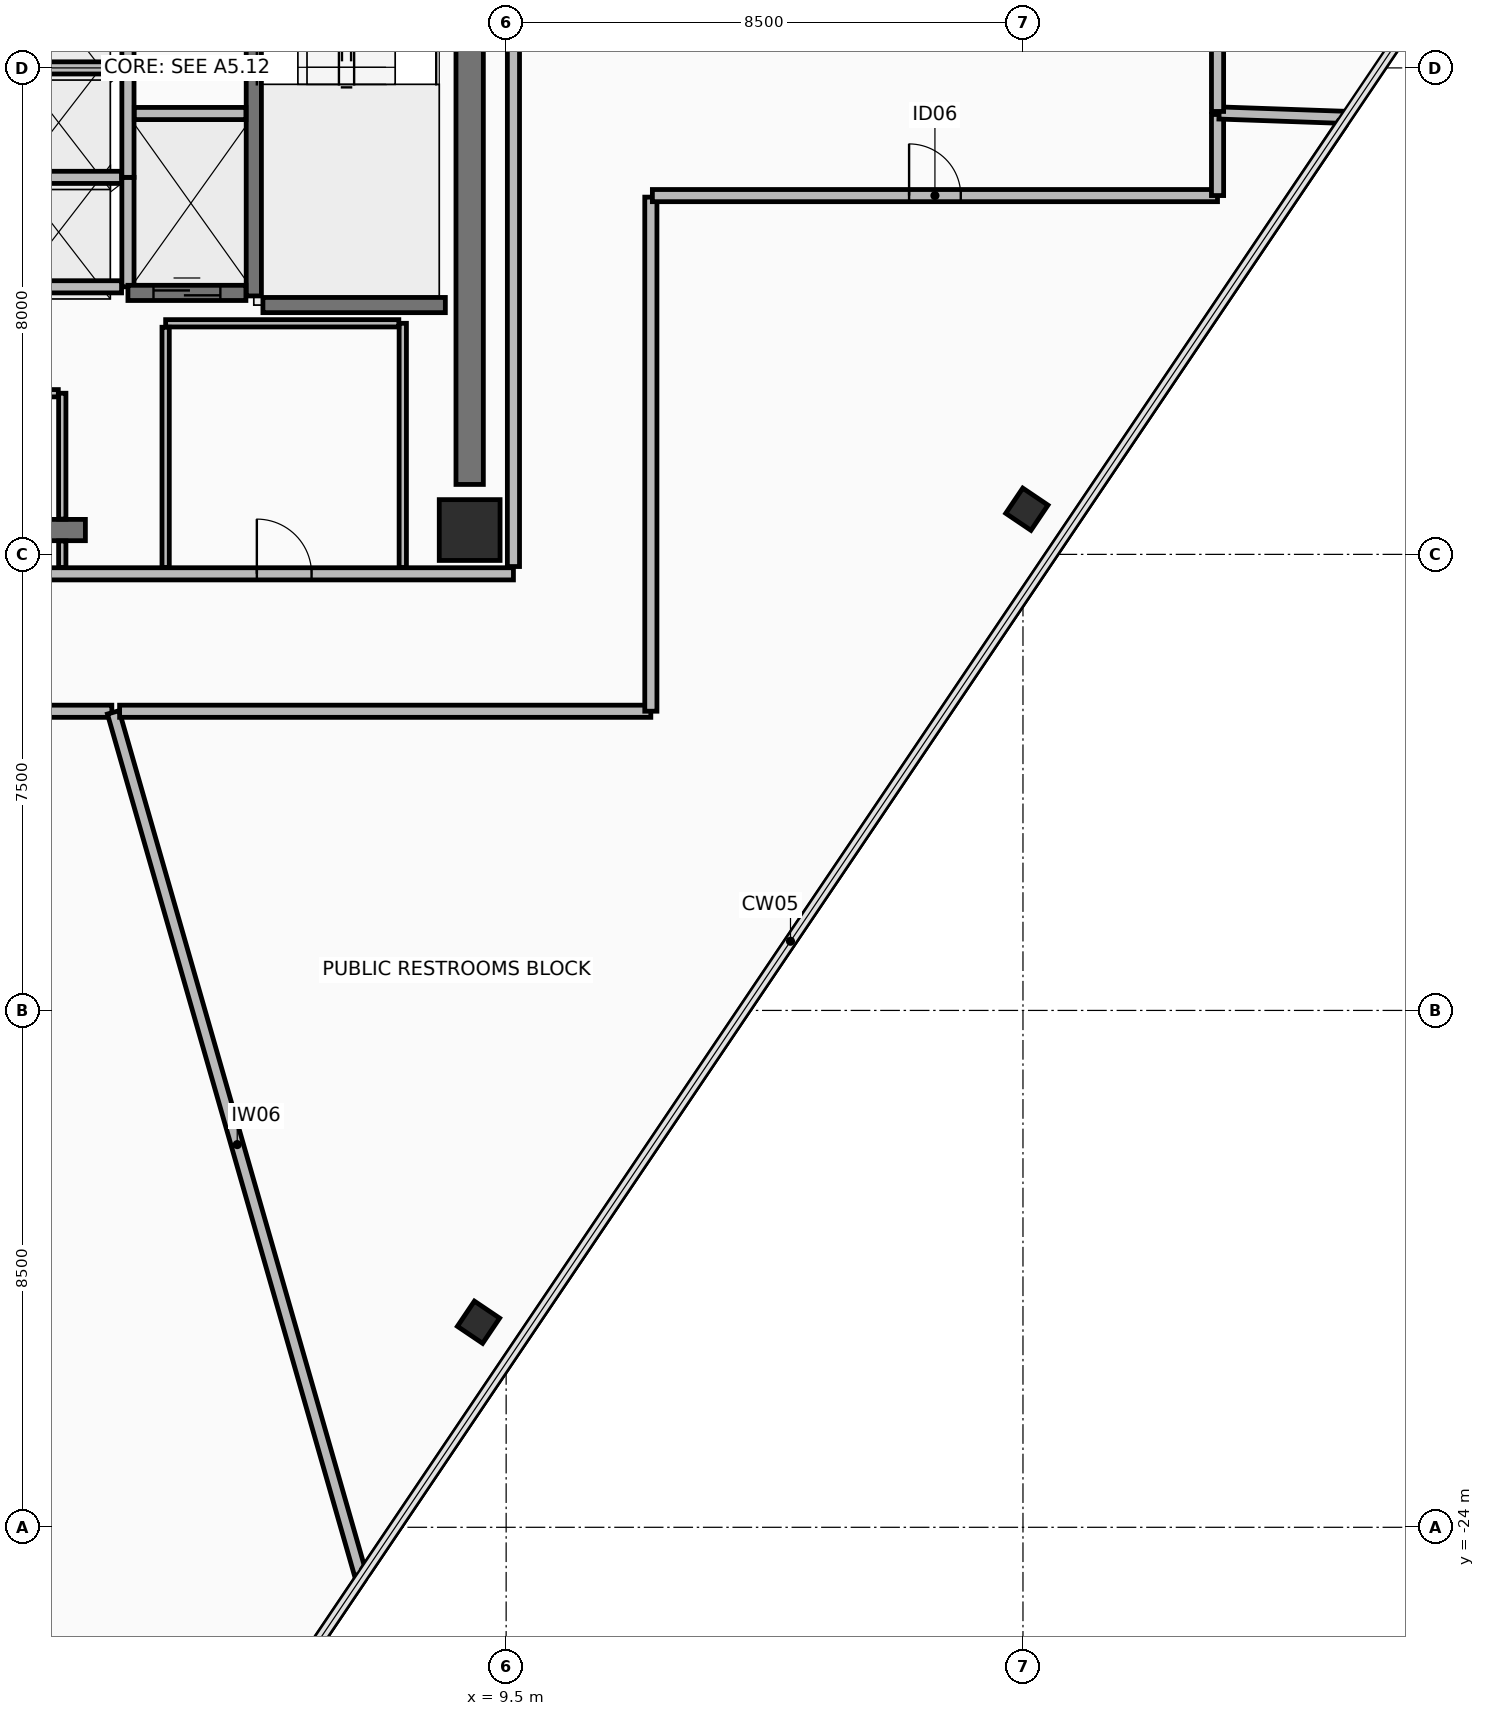
"""IFC4 building model, lengths in metres.
Left out: names, types, materials, properties, quantities, classifications, styles, units other than length and angle.
Written with IfcOpenShell. Run it as: python <this file> out.ifc"""

import sys

from ifc_helpers import new_model, si_unit, direction, frame, frame_2d, origin, origin_2d, place, context, subcontext, project, spatial, rectangle, hollow_rectangle, extrude, element, fill, save


model = new_model("IFC4")
c1 = context("Model", 3, precision=1e-05, world=origin(), true_north=direction((0.0, 1.0)))
c2 = subcontext(c1, "Body", "Model", "MODEL_VIEW")
j1 = project(units=[si_unit("LENGTHUNIT", "METRE"), si_unit("PLANEANGLEUNIT", "RADIAN")], contexts=[c1])
p1 = place(None, origin())
s1 = spatial("IfcSite", under=j1, at=p1, CompositionType="ELEMENT")
p2 = place(p1, origin())
s2 = spatial("IfcBuilding", under=s1, at=p2, CompositionType="ELEMENT")
p3 = place(p2, frame((0.0, 0.0, 230.65)))
s3 = spatial("IfcBuildingStorey", under=s2, at=p3, CompositionType="ELEMENT", Elevation=230.65)
p4 = place(p3, frame((8.9, -7.6, 0.0), z_axis=(0.0, 0.0, 1.0), x_axis=(1.0, 0.0, 0.0)))
e1 = element("IfcColumn", 1, at=p4, inside=s3, PredefinedType="COLUMN", context=c2, shape_type="SweptSolid", body=[
    extrude(rectangle(XDim=1.0, YDim=1.0, at=origin_2d()), origin(), (0.0, 0.0, 1.0), 3.6),
])
for number, where, z_axis, x_axis in (
    (2, (9.046, -20.628, 0.0), (0.0, 0.0, 1.0), (0.559, 0.829, 0.0)),
    (3, (18.064, -7.258, 0.0), (0.0, 0.0, 1.0), (0.559, 0.829, 0.0)),
):
    element("IfcColumn", number, at=place(p3, frame(where, z_axis=z_axis, x_axis=x_axis)), inside=s3, PredefinedType="COLUMN", context=c2, shape_type="SweptSolid", body=[
        extrude(hollow_rectangle(XDim=0.5, YDim=0.5, WallThickness=0.032, at=origin_2d()), origin(), (0.0, 0.0, 1.0), 3.6),
    ])
p5 = place(p3, frame((-2.8, -7.6, 0.0), z_axis=(0.0, 0.0, 1.0), x_axis=(1.0, 0.0, 0.0)))
e4 = element("IfcWall", 4, at=p5, inside=s3, PredefinedType="SHEAR", context=c2, shape_type="SweptSolid", body=[
    extrude(rectangle(XDim=5.38, YDim=0.35, at=frame_2d((2.69, 0.0))), origin(), (0.0, 0.0, 1.0), 3.42),
])
p6 = place(p3, frame((8.9, -6.85, 0.0), z_axis=(0.0, 0.0, 1.0), x_axis=(0.0, 1.0, 0.0)))
e5 = element("IfcWall", 5, at=p6, inside=s3, PredefinedType="SHEAR", context=c2, shape_type="SweptSolid", body=[
    extrude(rectangle(XDim=10.7, YDim=0.45, at=frame_2d((5.35, 0.0))), origin(), (0.0, 0.0, 1.0), 3.42),
])
p7 = place(p3, frame((-9.62, -8.32, 0.0), z_axis=(0.0, 0.0, 1.0), x_axis=(1.0, 0.0, 0.0)))
e6 = element("IfcWall", 6, at=p7, inside=s3, PredefinedType="PARTITIONING", context=c2, shape_type="SweptSolid", body=[
    extrude(rectangle(XDim=19.24, YDim=0.2, at=frame_2d((9.62, 0.0))), origin(), (0.0, 0.0, 1.0), 2.915),
])
p8 = place(p7, frame((8.57, 0.0, 0.0)))
e7 = element("IfcOpeningElement", 7, at=p8, cuts=e6, PredefinedType="OPENING", context=c2, shape_type="SweptSolid", body=[
    extrude(rectangle(XDim=0.9, YDim=2.1, at=frame_2d((0.45, 1.05))), frame((0.0, 0.11, 0.0), z_axis=(0.0, -1.0, 0.0), x_axis=(1.0, 0.0, 0.0)), (0.0, 0.0, 1.0), 0.22),
])
p9 = place(p7, frame((15.02, 0.0, 0.0)))
e8 = element("IfcOpeningElement", 8, at=p9, cuts=e6, PredefinedType="OPENING", context=c2, shape_type="SweptSolid", body=[
    extrude(rectangle(XDim=0.9, YDim=2.1, at=frame_2d((0.45, 1.05))), frame((0.0, 0.11, 0.0), z_axis=(0.0, -1.0, 0.0), x_axis=(1.0, 0.0, 0.0)), (0.0, 0.0, 1.0), 0.22),
])
p10 = place(p3, frame((9.62, -8.2, 0.0), z_axis=(0.0, 0.0, 1.0), x_axis=(0.0, 1.0, 0.0)))
e9 = element("IfcWall", 9, at=p10, inside=s3, PredefinedType="PARTITIONING", context=c2, shape_type="SweptSolid", body=[
    extrude(rectangle(XDim=16.4, YDim=0.2, at=frame_2d((8.2, 0.0))), origin(), (0.0, 0.0, 1.0), 2.915),
])
p11 = place(p10, frame((12.65, 0.0, 0.0)))
e10 = element("IfcOpeningElement", 10, at=p11, cuts=e9, PredefinedType="OPENING", context=c2, shape_type="SweptSolid", body=[
    extrude(rectangle(XDim=1.1, YDim=2.15, at=frame_2d((0.55, 1.075))), frame((0.0, 0.11, 0.0), z_axis=(0.0, -1.0, 0.0), x_axis=(1.0, 0.0, 0.0)), (0.0, 0.0, 1.0), 0.22),
])
p12 = place(p3, frame((5.35, -3.75, 0.0), z_axis=(0.0, 0.0, 1.0), x_axis=(0.0, 1.0, 0.0)))
e11 = element("IfcWall", 11, at=p12, inside=s3, PredefinedType="SHEAR", context=c2, shape_type="SweptSolid", body=[
    extrude(rectangle(XDim=7.3, YDim=0.25, at=frame_2d((3.65, 0.0))), origin(), (0.0, 0.0, 1.0), 3.42),
])
p13 = place(p3, frame((5.5, -3.9, 0.0), z_axis=(0.0, 0.0, 1.0), x_axis=(1.0, 0.0, 0.0)))
e12 = element("IfcWall", 12, at=p13, inside=s3, PredefinedType="SHEAR", context=c2, shape_type="SweptSolid", body=[
    extrude(rectangle(XDim=3.0, YDim=0.25, at=frame_2d((1.5, 0.0))), origin(), (0.0, 0.0, 1.0), 3.42),
])
p14 = place(p3, frame((3.28, -3.6, 0.0), z_axis=(0.0, 0.0, 1.0), x_axis=(0.0, 1.0, 0.0)))
e13 = element("IfcWall", 13, at=p14, inside=s3, PredefinedType="PARTITIONING", context=c2, shape_type="SweptSolid", body=[
    extrude(rectangle(XDim=1.8, YDim=0.2, at=frame_2d((0.9, 0.0))), origin(), (0.0, 0.0, 1.0), 3.42),
])
for number, where, z_axis, x_axis in (
    (14, (1.13, -3.6, 0.0), (0.0, 0.0, 1.0), (1.0, 0.0, 0.0)),
    (15, (1.13, -1.8, 0.0), (0.0, 0.0, 1.0), (1.0, 0.0, 0.0)),
):
    element("IfcWall", number, at=place(p3, frame(where, z_axis=z_axis, x_axis=x_axis)), inside=s3, PredefinedType="PARTITIONING", context=c2, shape_type="SweptSolid", body=[
        extrude(rectangle(XDim=2.045, YDim=0.2, at=frame_2d((1.022, 0.0))), origin(), (0.0, 0.0, 1.0), 3.42),
    ])
p15 = place(p3, frame((3.28, -1.8, 0.0), z_axis=(0.0, 0.0, 1.0), x_axis=(0.0, 1.0, 0.0)))
e16 = element("IfcWall", 16, at=p15, inside=s3, PredefinedType="PARTITIONING", context=c2, shape_type="SweptSolid", body=[
    extrude(rectangle(XDim=1.8, YDim=0.2, at=frame_2d((0.9, 0.0))), origin(), (0.0, 0.0, 1.0), 3.42),
])
p16 = place(p3, frame((1.13, 0.0, 0.0), z_axis=(0.0, 0.0, 1.0), x_axis=(1.0, 0.0, 0.0)))
e17 = element("IfcWall", 17, at=p16, inside=s3, PredefinedType="PARTITIONING", context=c2, shape_type="SweptSolid", body=[
    extrude(rectangle(XDim=2.045, YDim=0.2, at=frame_2d((1.022, 0.0))), origin(), (0.0, 0.0, 1.0), 3.42),
])
p17 = place(p3, frame((3.28, 0.0, 0.0), z_axis=(0.0, 0.0, 1.0), x_axis=(0.0, 1.0, 0.0)))
e18 = element("IfcWall", 18, at=p17, inside=s3, PredefinedType="PARTITIONING", context=c2, shape_type="SweptSolid", body=[
    extrude(rectangle(XDim=1.8, YDim=0.2, at=frame_2d((0.9, 0.0))), origin(), (0.0, 0.0, 1.0), 3.42),
])
p18 = place(p3, frame((3.28, -3.7, 0.0), z_axis=(0.0, 0.0, 1.0), x_axis=(1.0, 0.0, 0.0)))
e19 = element("IfcWall", 19, at=p18, inside=s3, PredefinedType="SHEAR", context=c2, shape_type="SweptSolid", body=[
    extrude(rectangle(XDim=1.94, YDim=0.25, at=frame_2d((0.97, 0.0))), origin(), (0.0, 0.0, 1.0), 3.42),
])
p19 = place(p18, frame((0.42, 0.0, 0.0)))
e20 = element("IfcOpeningElement", 20, at=p19, cuts=e19, PredefinedType="OPENING", context=c2, shape_type="SweptSolid", body=[
    extrude(rectangle(XDim=1.1, YDim=2.2, at=frame_2d((0.55, 1.1))), frame((0.0, 0.135, 0.0), z_axis=(0.0, -1.0, 0.0), x_axis=(1.0, 0.0, 0.0)), (0.0, 0.0, 1.0), 0.27),
])
p20 = place(p3, frame((3.385, -0.75, 0.0), z_axis=(0.0, 0.0, 1.0), x_axis=(1.0, 0.0, 0.0)))
e21 = element("IfcWall", 21, at=p20, inside=s3, PredefinedType="PARTITIONING", context=c2, shape_type="SweptSolid", body=[
    extrude(rectangle(XDim=1.835, YDim=0.2, at=frame_2d((0.917, 0.0))), origin(), (0.0, 0.0, 1.0), 3.42),
])
p21 = place(p3, frame((2.2, -8.215, 0.0), z_axis=(0.0, 0.0, 1.0), x_axis=(0.0, 1.0, 0.0)))
e22 = element("IfcWall", 22, at=p21, inside=s3, PredefinedType="PARTITIONING", context=c2, shape_type="SweptSolid", body=[
    extrude(rectangle(XDim=0.435, YDim=0.12, at=frame_2d((0.218, 0.0))), origin(), (0.0, 0.0, 1.0), 2.715),
])
p22 = place(p3, frame((2.2, -7.42, 0.0), z_axis=(0.0, 0.0, 1.0), x_axis=(0.0, 1.0, 0.0)))
e23 = element("IfcWall", 23, at=p22, inside=s3, PredefinedType="PARTITIONING", context=c2, shape_type="SweptSolid", body=[
    extrude(rectangle(XDim=2.07, YDim=0.12, at=frame_2d((1.035, 0.0))), origin(), (0.0, 0.0, 1.0), 2.715),
])
p23 = place(p3, frame((2.135, -5.35, 0.0), z_axis=(0.0, 0.0, 1.0), x_axis=(-1.0, 0.0, 0.0)))
e24 = element("IfcWall", 24, at=p23, inside=s3, PredefinedType="PARTITIONING", context=c2, shape_type="SweptSolid", body=[
    extrude(rectangle(XDim=5.535, YDim=0.12, at=frame_2d((2.768, 0.0))), origin(), (0.0, 0.0, 1.0), 2.715),
])
p24 = place(p3, frame((7.8, -8.215, 0.0), z_axis=(0.0, 0.0, 1.0), x_axis=(0.0, 1.0, 0.0)))
e25 = element("IfcWall", 25, at=p24, inside=s3, PredefinedType="PARTITIONING", context=c2, shape_type="SweptSolid", body=[
    extrude(rectangle(XDim=4.015, YDim=0.12, at=frame_2d((2.008, 0.0))), origin(), (0.0, 0.0, 1.0), 2.715),
])
p25 = place(p3, frame((7.735, -4.2, 0.0), z_axis=(0.0, 0.0, 1.0), x_axis=(-1.0, 0.0, 0.0)))
e26 = element("IfcWall", 26, at=p25, inside=s3, PredefinedType="PARTITIONING", context=c2, shape_type="SweptSolid", body=[
    extrude(rectangle(XDim=3.835, YDim=0.12, at=frame_2d((1.917, 0.0))), origin(), (0.0, 0.0, 1.0), 3.42),
])
p26 = place(p3, frame((3.9, -4.265, 0.0), z_axis=(0.0, 0.0, 1.0), x_axis=(0.0, -1.0, 0.0)))
e27 = element("IfcWall", 27, at=p26, inside=s3, PredefinedType="PARTITIONING", context=c2, shape_type="SweptSolid", body=[
    extrude(rectangle(XDim=3.95, YDim=0.12, at=frame_2d((1.975, 0.0))), origin(), (0.0, 0.0, 1.0), 2.715),
])
p27 = place(p3, frame((-11.879, -10.58, 0.0), z_axis=(0.0, 0.0, 1.0), x_axis=(1.0, 0.0, 0.0)))
e28 = element("IfcWall", 28, at=p27, inside=s3, PredefinedType="PARTITIONING", context=c2, shape_type="SweptSolid", body=[
    extrude(rectangle(XDim=14.894, YDim=0.2, at=frame_2d((7.447, 0.0))), origin(), (0.0, 0.0, 1.0), 2.915),
])
p28 = place(p27, frame((7.022, 0.0, 0.0)))
e29 = element("IfcOpeningElement", 29, at=p28, cuts=e28, PredefinedType="OPENING", context=c2, shape_type="SweptSolid", body=[
    extrude(rectangle(XDim=0.85, YDim=2.1, at=frame_2d((0.425, 1.05))), frame((0.0, 0.11, 0.0), z_axis=(0.0, -1.0, 0.0), x_axis=(1.0, 0.0, 0.0)), (0.0, 0.0, 1.0), 0.22),
])
p29 = place(p3, frame((3.039, -10.598, 0.0), z_axis=(0.0, 0.0, 1.0), x_axis=(0.275630178117, -0.961263754082, 0.0)))
e30 = element("IfcWall", 30, at=p29, inside=s3, PredefinedType="PARTITIONING", context=c2, shape_type="SweptSolid", body=[
    extrude(rectangle(XDim=14.79, YDim=0.2, at=frame_2d((7.395, 0.0))), origin(), (0.0, 0.0, 1.0), 2.765),
])
p30 = place(p3, frame((7.112, -24.835, 0.0), z_axis=(0.0, 0.0, 1.0), x_axis=(-0.559202616092, -0.829031021226, 0.0)))
e31 = element("IfcWall", 31, at=p30, inside=s3, PredefinedType="PARTITIONING", context=c2, shape_type="SweptSolid", body=[
    extrude(rectangle(XDim=12.678, YDim=0.15, at=frame_2d((6.339, 0.0))), origin(), (0.0, 0.0, 1.0), 3.42),
])
p31 = place(p3, frame((3.143, -10.58, 0.0), z_axis=(0.0, 0.0, 1.0), x_axis=(1.0, 0.0, 0.0)))
e32 = element("IfcWall", 32, at=p31, inside=s3, PredefinedType="PARTITIONING", context=c2, shape_type="SweptSolid", body=[
    extrude(rectangle(XDim=8.736, YDim=0.2, at=frame_2d((4.368, 0.0))), origin(), (0.0, 0.0, 1.0), 2.915),
])
p32 = place(p3, frame((11.88, -10.579, 0.0), z_axis=(0.0, 0.0, 1.0), x_axis=(0.0, 1.0, 0.0)))
e33 = element("IfcWall", 33, at=p32, inside=s3, PredefinedType="PARTITIONING", context=c2, shape_type="SweptSolid", body=[
    extrude(rectangle(XDim=8.454, YDim=0.2, at=frame_2d((4.227, 0.0))), origin(), (0.0, 0.0, 1.0), 2.915),
])
p33 = place(p3, frame((11.905, -2.1, 0.0), z_axis=(0.0, 0.0, 1.0), x_axis=(1.0, 0.0, 0.0)))
e34 = element("IfcWall", 34, at=p33, inside=s3, PredefinedType="PARTITIONING", context=c2, shape_type="SweptSolid", body=[
    extrude(rectangle(XDim=9.294, YDim=0.2, at=frame_2d((4.647, 0.0))), origin(), (0.0, 0.0, 1.0), 3.115),
])
p34 = place(p33, frame((4.222, 0.0, 0.0)))
e35 = element("IfcOpeningElement", 35, at=p34, cuts=e34, PredefinedType="OPENING", context=c2, shape_type="SweptSolid", body=[
    extrude(rectangle(XDim=0.85, YDim=2.1, at=frame_2d((0.425, 1.05))), frame((0.0, 0.11, 0.0), z_axis=(0.0, -1.0, 0.0), x_axis=(1.0, 0.0, 0.0)), (0.0, 0.0, 1.0), 0.22),
])
p35 = place(p3, frame((21.2, -2.099, 0.0), z_axis=(0.0, 0.0, 1.0), x_axis=(0.0, 1.0, 0.0)))
e36 = element("IfcWall", 36, at=p35, inside=s3, PredefinedType="PARTITIONING", context=c2, shape_type="SweptSolid", body=[
    extrude(rectangle(XDim=1.333, YDim=0.2, at=frame_2d((0.667, 0.0))), origin(), (0.0, 0.0, 1.0), 3.42),
])
p36 = place(p3, frame((21.226, -0.741, 0.0), z_axis=(0.0, 0.0, 1.0), x_axis=(0.999389938991, -0.034924917223, 0.0)))
e37 = element("IfcWall", 37, at=p36, inside=s3, PredefinedType="PARTITIONING", context=c2, shape_type="SweptSolid", body=[
    extrude(rectangle(XDim=2.09, YDim=0.2, at=frame_2d((1.045, 0.0))), origin(), (0.0, 0.0, 1.0), 2.765),
])
p37 = place(p3, frame((23.246, -0.917, 0.0), z_axis=(0.0, 0.0, 1.0), x_axis=(-0.559194966555, -0.829036180984, 0.0)))
e38 = element("IfcWall", 38, at=p37, inside=s3, PredefinedType="PARTITIONING", context=c2, shape_type="SweptSolid", body=[
    extrude(rectangle(XDim=28.702, YDim=0.15, at=frame_2d((14.351, 0.0))), origin(), (0.0, 0.0, 1.0), 3.42),
])
p38 = place(p3, frame((21.2, -0.716, 0.0), z_axis=(0.0, 0.0, 1.0), x_axis=(0.0, 1.0, 0.0)))
e39 = element("IfcWall", 39, at=p38, inside=s3, PredefinedType="PARTITIONING", context=c2, shape_type="SweptSolid", body=[
    extrude(rectangle(XDim=2.816, YDim=0.2, at=frame_2d((1.408, 0.0))), origin(), (0.0, 0.0, 1.0), 3.42),
])
p39 = place(p19, origin())
e40 = element("IfcDoor", 40, at=p39, inside=s3, OperationType="SLIDING_TO_LEFT", PredefinedType="DOOR", context=c2, shape_type="SweptSolid", body=[
    extrude(rectangle(XDim=1.1, YDim=2.2, at=frame_2d((0.55, 1.1))), frame((0.0, 0.025, 0.0), z_axis=(0.0, -1.0, 0.0), x_axis=(1.0, 0.0, 0.0)), (0.0, 0.0, 1.0), 0.05),
])
fill(e20, e40)
p40 = place(p9, origin())
e41 = element("IfcDoor", 41, at=p40, inside=s3, OperationType="SINGLE_SWING_LEFT", PredefinedType="DOOR", context=c2, shape_type="SweptSolid", body=[
    extrude(rectangle(XDim=0.9, YDim=2.1, at=frame_2d((0.45, 1.05))), frame((0.0, 0.025, 0.0), z_axis=(0.0, -1.0, 0.0), x_axis=(1.0, 0.0, 0.0)), (0.0, 0.0, 1.0), 0.05),
])
fill(e8, e41)
p41 = place(p34, origin())
e42 = element("IfcDoor", 42, at=p41, inside=s3, OperationType="SINGLE_SWING_RIGHT", PredefinedType="DOOR", context=c2, shape_type="SweptSolid", body=[
    extrude(rectangle(XDim=0.85, YDim=2.1, at=frame_2d((0.425, 1.05))), frame((0.0, 0.025, 0.0), z_axis=(0.0, -1.0, 0.0), x_axis=(1.0, 0.0, 0.0)), (0.0, 0.0, 1.0), 0.05),
])
fill(e35, e42)
save(model, sys.argv[1])
